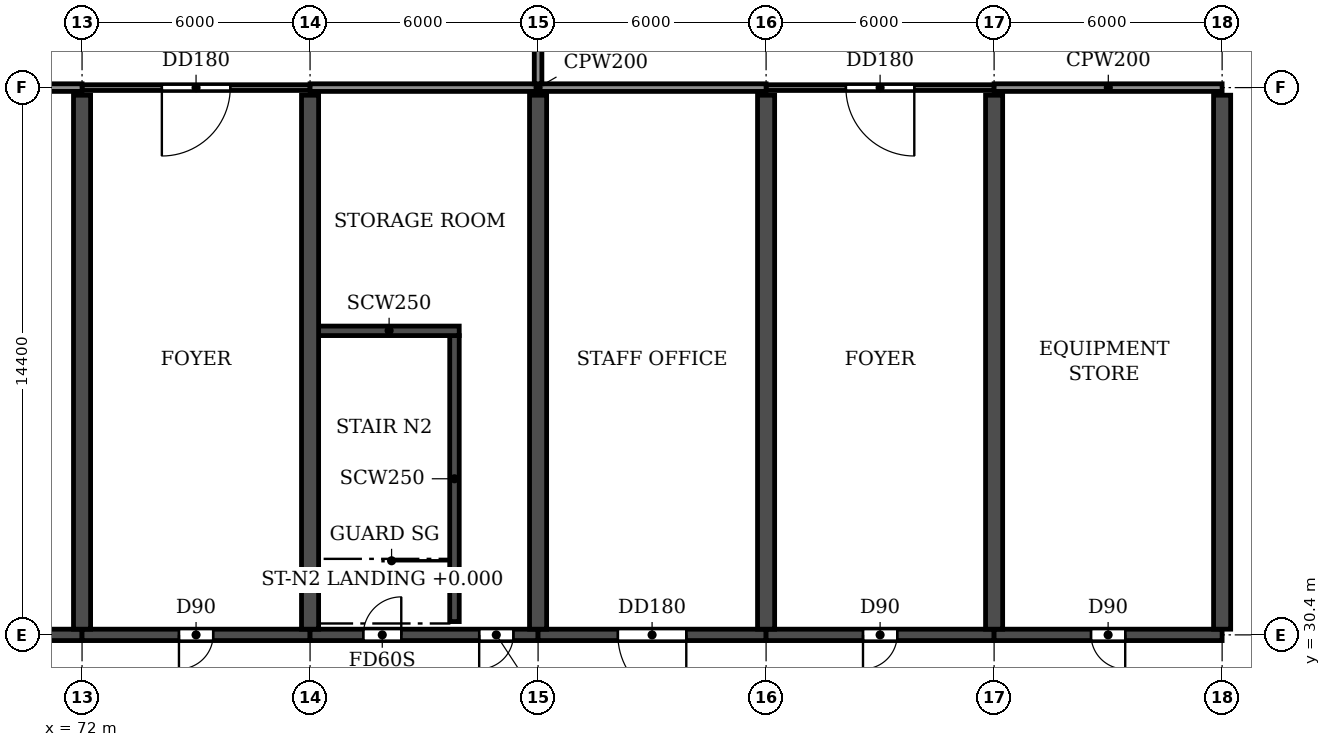
"""IFC4 building model, lengths in metres.
Left out: names, types, materials, properties, quantities, classifications, styles, units other than length and angle.
Written with IfcOpenShell. Run it as: python <this file> out.ifc"""

import sys

from ifc_helpers import new_model, si_unit, direction, frame, frame_2d, origin, place, context, subcontext, project, spatial, rectangle, extrude, element, fill, save


model = new_model("IFC4")
c1 = context("Model", 3, precision=1e-05, world=origin(), true_north=direction((0.0, 1.0)))
c2 = subcontext(c1, "Body", "Model", "MODEL_VIEW")
j1 = project(units=[si_unit("LENGTHUNIT", "METRE"), si_unit("PLANEANGLEUNIT", "RADIAN")], contexts=[c1])
p1 = place(None, origin())
s1 = spatial("IfcSite", under=j1, at=p1, CompositionType="ELEMENT")
p2 = place(p1, origin())
s2 = spatial("IfcBuilding", under=s1, at=p2, CompositionType="ELEMENT")
p3 = place(p2, frame((0.0, 0.0, 19.2)))
s3 = spatial("IfcBuildingStorey", under=s2, at=p3, CompositionType="ELEMENT", Elevation=19.2)
for number, where, z_axis, x_axis in (
    (1, (72.0, 30.55, 0.0), (0.0, 0.0, 1.0), (0.0, 1.0, 0.0)),
    (2, (78.0, 30.55, 0.0), (0.0, 0.0, 1.0), (0.0, 1.0, 0.0)),
    (3, (84.0, 30.55, 0.0), (0.0, 0.0, 1.0), (0.0, 1.0, 0.0)),
    (4, (90.0, 30.55, 0.0), (0.0, 0.0, 1.0), (0.0, 1.0, 0.0)),
    (5, (96.0, 30.55, 0.0), (0.0, 0.0, 1.0), (0.0, 1.0, 0.0)),
    (6, (102.0, 30.55, 0.0), (0.0, 0.0, 1.0), (0.0, 1.0, 0.0)),
):
    element("IfcWall", number, at=place(p3, frame(where, z_axis=z_axis, x_axis=x_axis)), inside=s3, PredefinedType="SHEAR", context=c2, shape_type="SweptSolid", body=[
        extrude(rectangle(XDim=14.05, YDim=0.45, at=frame_2d((7.025, 0.0))), origin(), (0.0, 0.0, 1.0), 3.95),
    ])
p4 = place(p3, frame((66.0, 30.4, 0.0), z_axis=(0.0, 0.0, 1.0), x_axis=(1.0, 0.0, 0.0)))
e7 = element("IfcWall", 7, at=p4, inside=s3, PredefinedType="SHEAR", context=c2, shape_type="SweptSolid", body=[
    extrude(rectangle(XDim=6.0, YDim=0.3, at=frame_2d((3.0, 0.0))), origin(), (0.0, 0.0, 1.0), 3.35),
])
p5 = place(p4, frame((2.55, 0.0, 0.0)))
e8 = element("IfcOpeningElement", 8, at=p5, cuts=e7, PredefinedType="OPENING", context=c2, shape_type="SweptSolid", body=[
    extrude(rectangle(XDim=0.9, YDim=2.1, at=frame_2d((0.45, 1.05))), frame((0.0, 0.16, 0.0), z_axis=(0.0, -1.0, 0.0), x_axis=(1.0, 0.0, 0.0)), (0.0, 0.0, 1.0), 0.32),
])
p6 = place(p3, frame((72.0, 30.4, 0.0), z_axis=(0.0, 0.0, 1.0), x_axis=(1.0, 0.0, 0.0)))
e9 = element("IfcWall", 9, at=p6, inside=s3, PredefinedType="SHEAR", context=c2, shape_type="SweptSolid", body=[
    extrude(rectangle(XDim=6.0, YDim=0.3, at=frame_2d((3.0, 0.0))), origin(), (0.0, 0.0, 1.0), 3.35),
])
p7 = place(p6, frame((2.55, 0.0, 0.0)))
e10 = element("IfcOpeningElement", 10, at=p7, cuts=e9, PredefinedType="OPENING", context=c2, shape_type="SweptSolid", body=[
    extrude(rectangle(XDim=0.9, YDim=2.1, at=frame_2d((0.45, 1.05))), frame((0.0, 0.16, 0.0), z_axis=(0.0, -1.0, 0.0), x_axis=(1.0, 0.0, 0.0)), (0.0, 0.0, 1.0), 0.32),
])
p8 = place(p3, frame((78.0, 30.4, 0.0), z_axis=(0.0, 0.0, 1.0), x_axis=(1.0, 0.0, 0.0)))
e11 = element("IfcWall", 11, at=p8, inside=s3, PredefinedType="SHEAR", context=c2, shape_type="SweptSolid", body=[
    extrude(rectangle(XDim=6.0, YDim=0.3, at=frame_2d((3.0, 0.0))), origin(), (0.0, 0.0, 1.0), 3.35),
])
p9 = place(p8, frame((1.4, 0.0, 0.0)))
e12 = element("IfcOpeningElement", 12, at=p9, cuts=e11, PredefinedType="OPENING", context=c2, shape_type="SweptSolid", body=[
    extrude(rectangle(XDim=1.0, YDim=2.1, at=frame_2d((0.5, 1.05))), frame((0.0, 0.16, 0.0), z_axis=(0.0, -1.0, 0.0), x_axis=(1.0, 0.0, 0.0)), (0.0, 0.0, 1.0), 0.32),
])
p10 = place(p8, frame((4.45, 0.0, 0.0)))
e13 = element("IfcOpeningElement", 13, at=p10, cuts=e11, PredefinedType="OPENING", context=c2, shape_type="SweptSolid", body=[
    extrude(rectangle(XDim=0.9, YDim=2.1, at=frame_2d((0.45, 1.05))), frame((0.0, 0.16, 0.0), z_axis=(0.0, -1.0, 0.0), x_axis=(1.0, 0.0, 0.0)), (0.0, 0.0, 1.0), 0.32),
])
p11 = place(p3, frame((84.0, 30.4, 0.0), z_axis=(0.0, 0.0, 1.0), x_axis=(1.0, 0.0, 0.0)))
e14 = element("IfcWall", 14, at=p11, inside=s3, PredefinedType="SHEAR", context=c2, shape_type="SweptSolid", body=[
    extrude(rectangle(XDim=6.0, YDim=0.3, at=frame_2d((3.0, 0.0))), origin(), (0.0, 0.0, 1.0), 3.35),
])
p12 = place(p11, frame((2.1, 0.0, 0.0)))
e15 = element("IfcOpeningElement", 15, at=p12, cuts=e14, PredefinedType="OPENING", context=c2, shape_type="SweptSolid", body=[
    extrude(rectangle(XDim=1.8, YDim=2.1, at=frame_2d((0.9, 1.05))), frame((0.0, 0.16, 0.0), z_axis=(0.0, -1.0, 0.0), x_axis=(1.0, 0.0, 0.0)), (0.0, 0.0, 1.0), 0.32),
])
p13 = place(p3, frame((90.0, 30.4, 0.0), z_axis=(0.0, 0.0, 1.0), x_axis=(1.0, 0.0, 0.0)))
e16 = element("IfcWall", 16, at=p13, inside=s3, PredefinedType="SHEAR", context=c2, shape_type="SweptSolid", body=[
    extrude(rectangle(XDim=6.0, YDim=0.3, at=frame_2d((3.0, 0.0))), origin(), (0.0, 0.0, 1.0), 3.35),
])
p14 = place(p13, frame((2.55, 0.0, 0.0)))
e17 = element("IfcOpeningElement", 17, at=p14, cuts=e16, PredefinedType="OPENING", context=c2, shape_type="SweptSolid", body=[
    extrude(rectangle(XDim=0.9, YDim=2.1, at=frame_2d((0.45, 1.05))), frame((0.0, 0.16, 0.0), z_axis=(0.0, -1.0, 0.0), x_axis=(1.0, 0.0, 0.0)), (0.0, 0.0, 1.0), 0.32),
])
p15 = place(p3, frame((96.0, 30.4, 0.0), z_axis=(0.0, 0.0, 1.0), x_axis=(1.0, 0.0, 0.0)))
e18 = element("IfcWall", 18, at=p15, inside=s3, PredefinedType="SHEAR", context=c2, shape_type="SweptSolid", body=[
    extrude(rectangle(XDim=6.0, YDim=0.3, at=frame_2d((3.0, 0.0))), origin(), (0.0, 0.0, 1.0), 3.35),
])
p16 = place(p15, frame((2.55, 0.0, 0.0)))
e19 = element("IfcOpeningElement", 19, at=p16, cuts=e18, PredefinedType="OPENING", context=c2, shape_type="SweptSolid", body=[
    extrude(rectangle(XDim=0.9, YDim=2.1, at=frame_2d((0.45, 1.05))), frame((0.0, 0.16, 0.0), z_axis=(0.0, -1.0, 0.0), x_axis=(1.0, 0.0, 0.0)), (0.0, 0.0, 1.0), 0.32),
])
p17 = place(p3, frame((81.8, 30.75, 0.0), z_axis=(0.0, 0.0, 1.0), x_axis=(0.0, 1.0, 0.0)))
e20 = element("IfcWall", 20, at=p17, inside=s3, PredefinedType="SOLIDWALL", context=c2, shape_type="SweptSolid", body=[
    extrude(rectangle(XDim=7.525, YDim=0.25, at=frame_2d((3.762, 0.0))), origin(), (0.0, 0.0, 1.0), 3.95),
])
p18 = place(p3, frame((78.0, 38.4, 0.0), z_axis=(0.0, 0.0, 1.0), x_axis=(1.0, 0.0, 0.0)))
e21 = element("IfcWall", 21, at=p18, inside=s3, PredefinedType="SOLIDWALL", context=c2, shape_type="SweptSolid", body=[
    extrude(rectangle(XDim=3.925, YDim=0.25, at=frame_2d((1.962, 0.0))), origin(), (0.0, 0.0, 1.0), 3.95),
])
p19 = place(p3, frame((72.0, 44.8, 0.0), z_axis=(0.0, 0.0, 1.0), x_axis=(1.0, 0.0, 0.0)))
e22 = element("IfcWall", 22, at=p19, inside=s3, PredefinedType="PARTITIONING", context=c2, shape_type="SweptSolid", body=[
    extrude(rectangle(XDim=6.0, YDim=0.15, at=frame_2d((3.0, 0.0))), origin(), (0.0, 0.0, 1.0), 3.95),
])
p20 = place(p19, frame((2.1, 0.0, 0.0)))
e23 = element("IfcOpeningElement", 23, at=p20, cuts=e22, PredefinedType="OPENING", context=c2, shape_type="SweptSolid", body=[
    extrude(rectangle(XDim=1.8, YDim=2.1, at=frame_2d((0.9, 1.05))), frame((0.0, 0.085, 0.0), z_axis=(0.0, -1.0, 0.0), x_axis=(1.0, 0.0, 0.0)), (0.0, 0.0, 1.0), 0.17),
])
p21 = place(p3, frame((90.0, 44.8, 0.0), z_axis=(0.0, 0.0, 1.0), x_axis=(1.0, 0.0, 0.0)))
e24 = element("IfcWall", 24, at=p21, inside=s3, PredefinedType="PARTITIONING", context=c2, shape_type="SweptSolid", body=[
    extrude(rectangle(XDim=6.0, YDim=0.15, at=frame_2d((3.0, 0.0))), origin(), (0.0, 0.0, 1.0), 3.95),
])
p22 = place(p21, frame((2.1, 0.0, 0.0)))
e25 = element("IfcOpeningElement", 25, at=p22, cuts=e24, PredefinedType="OPENING", context=c2, shape_type="SweptSolid", body=[
    extrude(rectangle(XDim=1.8, YDim=2.1, at=frame_2d((0.9, 1.05))), frame((0.0, 0.085, 0.0), z_axis=(0.0, -1.0, 0.0), x_axis=(1.0, 0.0, 0.0)), (0.0, 0.0, 1.0), 0.17),
])
p23 = place(p3, frame((54.0, 44.8, 0.0), z_axis=(0.0, 0.0, 1.0), x_axis=(1.0, 0.0, 0.0)))
e26 = element("IfcWall", 26, at=p23, inside=s3, PredefinedType="PARTITIONING", context=c2, shape_type="SweptSolid", body=[
    extrude(rectangle(XDim=18.0, YDim=0.2, at=frame_2d((9.0, 0.0))), origin(), (0.0, 0.0, 1.0), 3.95),
])
p24 = place(p3, frame((78.0, 44.8, 0.0), z_axis=(0.0, 0.0, 1.0), x_axis=(1.0, 0.0, 0.0)))
e27 = element("IfcWall", 27, at=p24, inside=s3, PredefinedType="PARTITIONING", context=c2, shape_type="SweptSolid", body=[
    extrude(rectangle(XDim=12.0, YDim=0.2, at=frame_2d((6.0, 0.0))), origin(), (0.0, 0.0, 1.0), 3.95),
])
p25 = place(p3, frame((96.0, 44.8, 0.0), z_axis=(0.0, 0.0, 1.0), x_axis=(1.0, 0.0, 0.0)))
e28 = element("IfcWall", 28, at=p25, inside=s3, PredefinedType="PARTITIONING", context=c2, shape_type="SweptSolid", body=[
    extrude(rectangle(XDim=6.0, YDim=0.2, at=frame_2d((3.0, 0.0))), origin(), (0.0, 0.0, 1.0), 3.95),
])
p26 = place(p3, frame((84.0, 44.9, 0.0), z_axis=(0.0, 0.0, 1.0), x_axis=(0.0, 1.0, 0.0)))
e29 = element("IfcWall", 29, at=p26, inside=s3, PredefinedType="PARTITIONING", context=c2, shape_type="SweptSolid", body=[
    extrude(rectangle(XDim=5.84, YDim=0.2, at=frame_2d((2.92, 0.0))), origin(), (0.0, 0.0, 1.0), 3.95),
])
p27 = place(p7, frame((0.9, 0.0, 0.0), z_axis=(0.0, 0.0, 1.0), x_axis=(-1.0, 0.0, 0.0)))
e30 = element("IfcDoor", 30, at=p27, inside=s3, OperationType="SINGLE_SWING_RIGHT", PredefinedType="DOOR", context=c2, shape_type="SweptSolid", body=[
    extrude(rectangle(XDim=0.9, YDim=2.1, at=frame_2d((0.45, 1.05))), frame((0.0, 0.025, 0.0), z_axis=(0.0, -1.0, 0.0), x_axis=(1.0, 0.0, 0.0)), (0.0, 0.0, 1.0), 0.05),
])
fill(e10, e30)
p28 = place(p9, origin())
e31 = element("IfcDoor", 31, at=p28, inside=s3, OperationType="SINGLE_SWING_RIGHT", PredefinedType="DOOR", context=c2, shape_type="SweptSolid", body=[
    extrude(rectangle(XDim=1.0, YDim=2.1, at=frame_2d((0.5, 1.05))), frame((0.0, 0.025, 0.0), z_axis=(0.0, -1.0, 0.0), x_axis=(1.0, 0.0, 0.0)), (0.0, 0.0, 1.0), 0.05),
])
fill(e12, e31)
p29 = place(p10, frame((0.9, 0.0, 0.0), z_axis=(0.0, 0.0, 1.0), x_axis=(-1.0, 0.0, 0.0)))
e32 = element("IfcDoor", 32, at=p29, inside=s3, OperationType="SINGLE_SWING_RIGHT", PredefinedType="DOOR", context=c2, shape_type="SweptSolid", body=[
    extrude(rectangle(XDim=0.9, YDim=2.1, at=frame_2d((0.45, 1.05))), frame((0.0, 0.025, 0.0), z_axis=(0.0, -1.0, 0.0), x_axis=(1.0, 0.0, 0.0)), (0.0, 0.0, 1.0), 0.05),
])
fill(e13, e32)
p30 = place(p12, frame((1.8, 0.0, 0.0), z_axis=(0.0, 0.0, 1.0), x_axis=(-1.0, 0.0, 0.0)))
e33 = element("IfcDoor", 33, at=p30, inside=s3, OperationType="DOUBLE_DOOR_SINGLE_SWING", PredefinedType="DOOR", context=c2, shape_type="SweptSolid", body=[
    extrude(rectangle(XDim=1.8, YDim=2.1, at=frame_2d((0.9, 1.05))), frame((0.0, 0.025, 0.0), z_axis=(0.0, -1.0, 0.0), x_axis=(1.0, 0.0, 0.0)), (0.0, 0.0, 1.0), 0.05),
])
fill(e15, e33)
p31 = place(p14, frame((0.9, 0.0, 0.0), z_axis=(0.0, 0.0, 1.0), x_axis=(-1.0, 0.0, 0.0)))
e34 = element("IfcDoor", 34, at=p31, inside=s3, OperationType="SINGLE_SWING_RIGHT", PredefinedType="DOOR", context=c2, shape_type="SweptSolid", body=[
    extrude(rectangle(XDim=0.9, YDim=2.1, at=frame_2d((0.45, 1.05))), frame((0.0, 0.025, 0.0), z_axis=(0.0, -1.0, 0.0), x_axis=(1.0, 0.0, 0.0)), (0.0, 0.0, 1.0), 0.05),
])
fill(e17, e34)
p32 = place(p16, frame((0.9, 0.0, 0.0), z_axis=(0.0, 0.0, 1.0), x_axis=(-1.0, 0.0, 0.0)))
e35 = element("IfcDoor", 35, at=p32, inside=s3, OperationType="SINGLE_SWING_LEFT", PredefinedType="DOOR", context=c2, shape_type="SweptSolid", body=[
    extrude(rectangle(XDim=0.9, YDim=2.1, at=frame_2d((0.45, 1.05))), frame((0.0, 0.025, 0.0), z_axis=(0.0, -1.0, 0.0), x_axis=(1.0, 0.0, 0.0)), (0.0, 0.0, 1.0), 0.05),
])
fill(e19, e35)
p33 = place(p20, frame((1.8, 0.0, 0.0), z_axis=(0.0, 0.0, 1.0), x_axis=(-1.0, 0.0, 0.0)))
e36 = element("IfcDoor", 36, at=p33, inside=s3, OperationType="DOUBLE_DOOR_SINGLE_SWING", PredefinedType="DOOR", context=c2, shape_type="SweptSolid", body=[
    extrude(rectangle(XDim=1.8, YDim=2.1, at=frame_2d((0.9, 1.05))), frame((0.0, 0.025, 0.0), z_axis=(0.0, -1.0, 0.0), x_axis=(1.0, 0.0, 0.0)), (0.0, 0.0, 1.0), 0.05),
])
fill(e23, e36)
p34 = place(p22, frame((1.8, 0.0, 0.0), z_axis=(0.0, 0.0, 1.0), x_axis=(-1.0, 0.0, 0.0)))
e37 = element("IfcDoor", 37, at=p34, inside=s3, OperationType="DOUBLE_DOOR_SINGLE_SWING", PredefinedType="DOOR", context=c2, shape_type="SweptSolid", body=[
    extrude(rectangle(XDim=1.8, YDim=2.1, at=frame_2d((0.9, 1.05))), frame((0.0, 0.025, 0.0), z_axis=(0.0, -1.0, 0.0), x_axis=(1.0, 0.0, 0.0)), (0.0, 0.0, 1.0), 0.05),
])
fill(e25, e37)
save(model, sys.argv[1])
